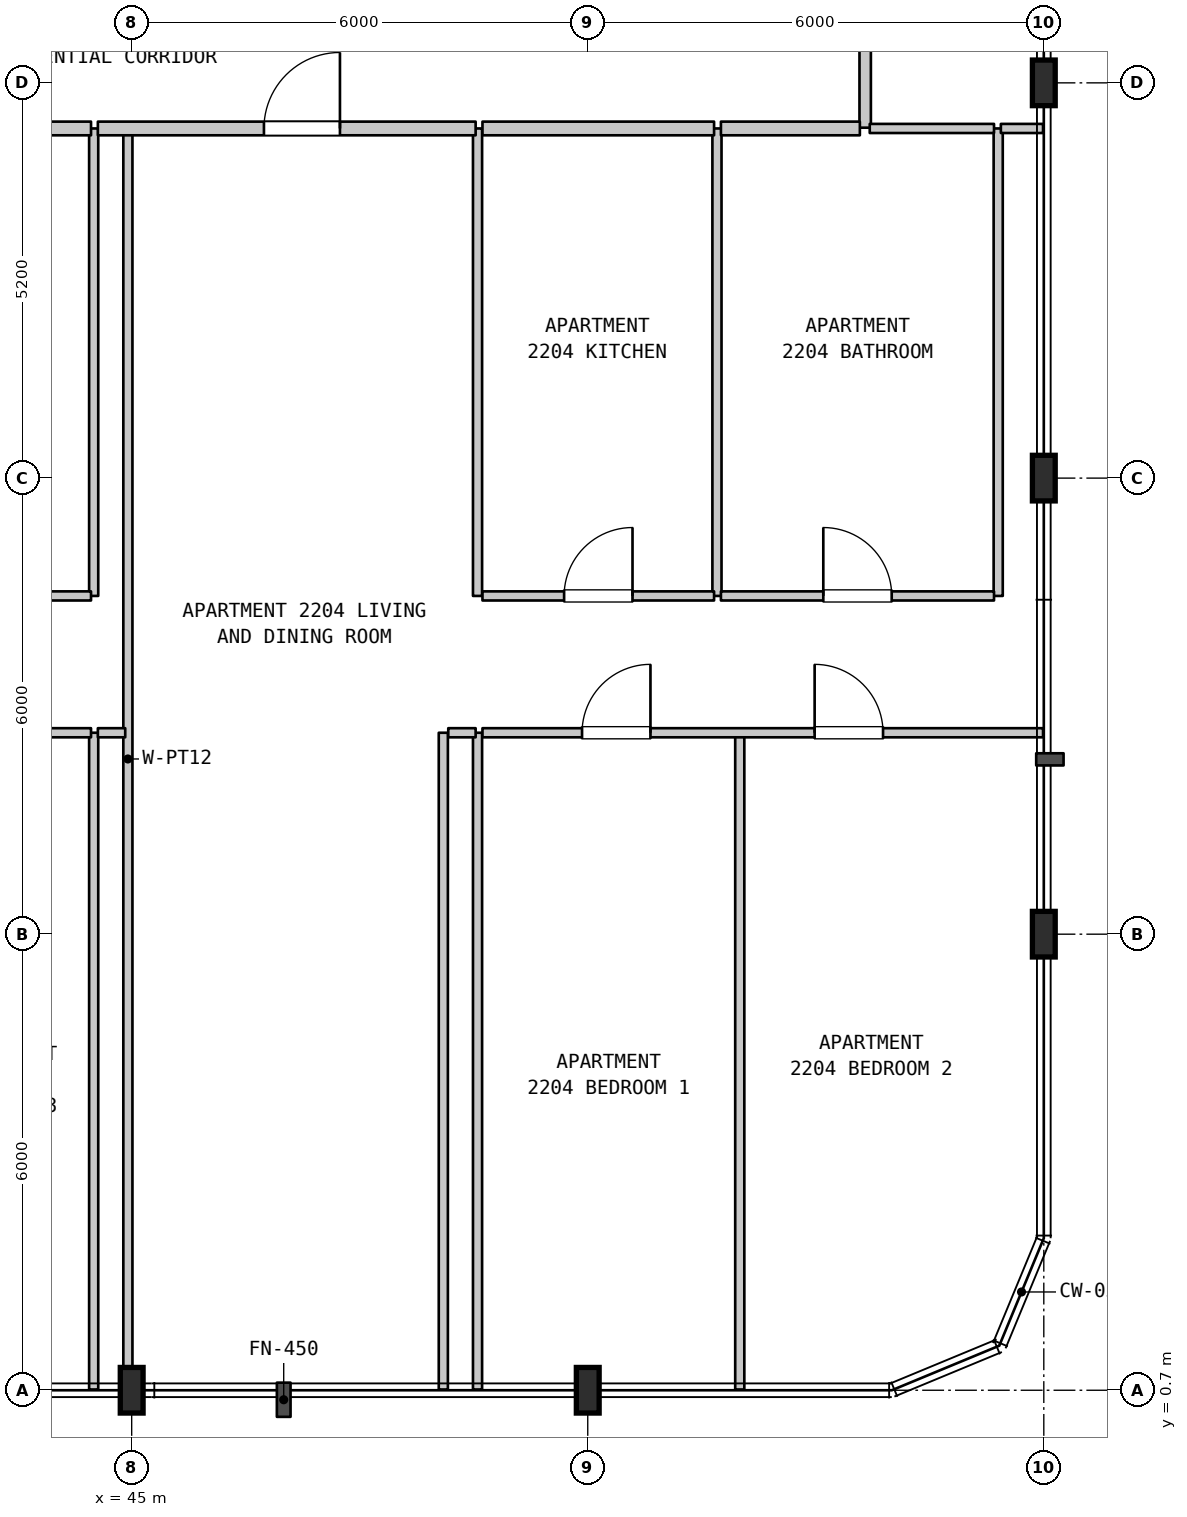
"""IFC4 building model, lengths in metres.
Left out: names, types, materials, properties, quantities, classifications, styles, units other than length and angle.
Written with IfcOpenShell. Run it as: python <this file> out.ifc"""

import sys

from ifc_helpers import new_model, si_unit, direction, frame, frame_2d, origin, origin_2d, place, context, subcontext, project, spatial, rectangle, i_section, extrude, element, fill, save


model = new_model("IFC4")
c1 = context("Model", 3, precision=1e-05, world=origin(), true_north=direction((0.0, 1.0)))
c2 = subcontext(c1, "Body", "Model", "MODEL_VIEW")
j1 = project(units=[si_unit("LENGTHUNIT", "METRE"), si_unit("PLANEANGLEUNIT", "RADIAN")], contexts=[c1])
p1 = place(None, origin())
s1 = spatial("IfcSite", under=j1, at=p1, CompositionType="ELEMENT")
p2 = place(p1, origin())
s2 = spatial("IfcBuilding", under=s1, at=p2, CompositionType="ELEMENT")
p3 = place(p2, frame((0.0, 0.0, 94.6)))
s3 = spatial("IfcBuildingStorey", under=s2, at=p3, CompositionType="ELEMENT", Elevation=94.6)
for number, where, z_axis, x_axis in (
    (1, (45.0, 0.7, 0.0), (0.0, 0.0, 1.0), (1.0, 0.0, 0.0)),
    (2, (51.0, 0.7, 0.0), (0.0, 0.0, 1.0), (1.0, 0.0, 0.0)),
    (3, (57.0, 6.7, 0.0), (0.0, 0.0, 1.0), (1.0, 0.0, 0.0)),
    (4, (57.0, 12.7, 0.0), (0.0, 0.0, 1.0), (1.0, 0.0, 0.0)),
    (5, (57.0, 17.9, 0.0), (0.0, 0.0, 1.0), (1.0, 0.0, 0.0)),
):
    element("IfcColumn", number, at=place(p3, frame(where, z_axis=z_axis, x_axis=x_axis)), inside=s3, PredefinedType="COLUMN", context=c2, shape_type="SweptSolid", body=[
        extrude(i_section(OverallWidth=0.3, OverallDepth=0.6, WebThickness=0.015, FlangeThickness=0.03, FilletRadius=0.027, at=origin_2d()), origin(), (0.0, 0.0, 1.0), 3.7),
    ])
p4 = place(p3, frame((44.5, 0.71, 0.0), z_axis=(0.0, 0.0, 1.0), x_axis=(0.0, 1.0, 0.0)))
e6 = element("IfcWall", 6, at=p4, inside=s3, PredefinedType="PARTITIONING", context=c2, shape_type="SweptSolid", body=[
    extrude(rectangle(XDim=8.64, YDim=0.12, at=frame_2d((4.32, 0.0))), origin(), (0.0, 0.0, 1.0), 3.385),
])
p5 = place(p3, frame((44.5, 11.15, 0.0), z_axis=(0.0, 0.0, 1.0), x_axis=(0.0, 1.0, 0.0)))
e7 = element("IfcWall", 7, at=p5, inside=s3, PredefinedType="PARTITIONING", context=c2, shape_type="SweptSolid", body=[
    extrude(rectangle(XDim=6.15, YDim=0.12, at=frame_2d((3.075, 0.0))), origin(), (0.0, 0.0, 1.0), 3.385),
])
p6 = place(p3, frame((44.95, 0.71, 0.0), z_axis=(0.0, 0.0, 1.0), x_axis=(0.0, 1.0, 0.0)))
e8 = element("IfcWall", 8, at=p6, inside=s3, PredefinedType="PARTITIONING", context=c2, shape_type="SweptSolid", body=[
    extrude(rectangle(XDim=16.59, YDim=0.12, at=frame_2d((8.295, 0.0))), origin(), (0.0, 0.0, 1.0), 3.385),
])
for number, where, z_axis, x_axis in (
    (9, (49.1, 0.71, 0.0), (0.0, 0.0, 1.0), (0.0, 1.0, 0.0)),
    (10, (49.55, 0.71, 0.0), (0.0, 0.0, 1.0), (0.0, 1.0, 0.0)),
):
    element("IfcWall", number, at=place(p3, frame(where, z_axis=z_axis, x_axis=x_axis)), inside=s3, PredefinedType="PARTITIONING", context=c2, shape_type="SweptSolid", body=[
        extrude(rectangle(XDim=8.64, YDim=0.12, at=frame_2d((4.32, 0.0))), origin(), (0.0, 0.0, 1.0), 3.385),
    ])
for number, where, z_axis, x_axis in (
    (11, (49.55, 11.15, 0.0), (0.0, 0.0, 1.0), (0.0, 1.0, 0.0)),
    (12, (52.7, 11.15, 0.0), (0.0, 0.0, 1.0), (0.0, 1.0, 0.0)),
):
    element("IfcWall", number, at=place(p3, frame(where, z_axis=z_axis, x_axis=x_axis)), inside=s3, PredefinedType="PARTITIONING", context=c2, shape_type="SweptSolid", body=[
        extrude(rectangle(XDim=6.15, YDim=0.12, at=frame_2d((3.075, 0.0))), origin(), (0.0, 0.0, 1.0), 3.385),
    ])
p7 = place(p3, frame((53.0, 0.71, 0.0), z_axis=(0.0, 0.0, 1.0), x_axis=(0.0, 1.0, 0.0)))
e13 = element("IfcWall", 13, at=p7, inside=s3, PredefinedType="PARTITIONING", context=c2, shape_type="SweptSolid", body=[
    extrude(rectangle(XDim=8.64, YDim=0.12, at=frame_2d((4.32, 0.0))), origin(), (0.0, 0.0, 1.0), 3.385),
])
p8 = place(p3, frame((54.65, 17.31, 0.0), z_axis=(0.0, 0.0, 1.0), x_axis=(0.0, 1.0, 0.0)))
e14 = element("IfcWall", 14, at=p8, inside=s3, PredefinedType="STANDARD", context=c2, shape_type="SweptSolid", body=[
    extrude(rectangle(XDim=2.19, YDim=0.15, at=frame_2d((1.095, 0.0))), origin(), (0.0, 0.0, 1.0), 3.385),
])
p9 = place(p3, frame((56.4, 11.15, 0.0), z_axis=(0.0, 0.0, 1.0), x_axis=(0.0, 1.0, 0.0)))
e15 = element("IfcWall", 15, at=p9, inside=s3, PredefinedType="PARTITIONING", context=c2, shape_type="SweptSolid", body=[
    extrude(rectangle(XDim=6.15, YDim=0.12, at=frame_2d((3.075, 0.0))), origin(), (0.0, 0.0, 1.0), 3.385),
])
p10 = place(p3, frame((37.425, 9.35, 0.0), z_axis=(0.0, 0.0, 1.0), x_axis=(1.0, 0.0, 0.0)))
e16 = element("IfcWall", 16, at=p10, inside=s3, PredefinedType="PARTITIONING", context=c2, shape_type="SweptSolid", body=[
    extrude(rectangle(XDim=7.04, YDim=0.12, at=frame_2d((3.52, 0.0))), origin(), (0.0, 0.0, 1.0), 3.385),
])
p11 = place(p10, frame((0.868, 0.0, 0.0)))
e17 = element("IfcOpeningElement", 17, at=p11, cuts=e16, PredefinedType="OPENING", context=c2, shape_type="SweptSolid", body=[
    extrude(rectangle(XDim=0.9, YDim=2.15, at=frame_2d((0.45, 1.075))), frame((0.0, 0.07, 0.0), z_axis=(0.0, -1.0, 0.0), x_axis=(1.0, 0.0, 0.0)), (0.0, 0.0, 1.0), 0.14),
])
p12 = place(p10, frame((2.999, 0.0, 0.0)))
e18 = element("IfcOpeningElement", 18, at=p12, cuts=e16, PredefinedType="OPENING", context=c2, shape_type="SweptSolid", body=[
    extrude(rectangle(XDim=0.9, YDim=2.15, at=frame_2d((0.45, 1.075))), frame((0.0, 0.07, 0.0), z_axis=(0.0, -1.0, 0.0), x_axis=(1.0, 0.0, 0.0)), (0.0, 0.0, 1.0), 0.14),
])
p13 = place(p10, frame((5.272, 0.0, 0.0)))
e19 = element("IfcOpeningElement", 19, at=p13, cuts=e16, PredefinedType="OPENING", context=c2, shape_type="SweptSolid", body=[
    extrude(rectangle(XDim=0.9, YDim=2.15, at=frame_2d((0.45, 1.075))), frame((0.0, 0.07, 0.0), z_axis=(0.0, -1.0, 0.0), x_axis=(1.0, 0.0, 0.0)), (0.0, 0.0, 1.0), 0.14),
])
p14 = place(p3, frame((44.555, 9.35, 0.0), z_axis=(0.0, 0.0, 1.0), x_axis=(1.0, 0.0, 0.0)))
e20 = element("IfcWall", 20, at=p14, inside=s3, PredefinedType="PARTITIONING", context=c2, shape_type="SweptSolid", body=[
    extrude(rectangle(XDim=0.36, YDim=0.12, at=frame_2d((0.18, 0.0))), origin(), (0.0, 0.0, 1.0), 3.385),
])
p15 = place(p3, frame((49.165, 9.35, 0.0), z_axis=(0.0, 0.0, 1.0), x_axis=(1.0, 0.0, 0.0)))
e21 = element("IfcWall", 21, at=p15, inside=s3, PredefinedType="PARTITIONING", context=c2, shape_type="SweptSolid", body=[
    extrude(rectangle(XDim=0.36, YDim=0.12, at=frame_2d((0.18, 0.0))), origin(), (0.0, 0.0, 1.0), 3.385),
])
p16 = place(p3, frame((49.615, 9.35, 0.0), z_axis=(0.0, 0.0, 1.0), x_axis=(1.0, 0.0, 0.0)))
e22 = element("IfcWall", 22, at=p16, inside=s3, PredefinedType="PARTITIONING", context=c2, shape_type="SweptSolid", body=[
    extrude(rectangle(XDim=7.375, YDim=0.12, at=frame_2d((3.688, 0.0))), origin(), (0.0, 0.0, 1.0), 3.385),
])
p17 = place(p16, frame((1.31, 0.0, 0.0)))
e23 = element("IfcOpeningElement", 23, at=p17, cuts=e22, PredefinedType="OPENING", context=c2, shape_type="SweptSolid", body=[
    extrude(rectangle(XDim=0.9, YDim=2.15, at=frame_2d((0.45, 1.075))), frame((0.0, 0.07, 0.0), z_axis=(0.0, -1.0, 0.0), x_axis=(1.0, 0.0, 0.0)), (0.0, 0.0, 1.0), 0.14),
])
p18 = place(p16, frame((4.37, 0.0, 0.0)))
e24 = element("IfcOpeningElement", 24, at=p18, cuts=e22, PredefinedType="OPENING", context=c2, shape_type="SweptSolid", body=[
    extrude(rectangle(XDim=0.9, YDim=2.15, at=frame_2d((0.45, 1.075))), frame((0.0, 0.07, 0.0), z_axis=(0.0, -1.0, 0.0), x_axis=(1.0, 0.0, 0.0)), (0.0, 0.0, 1.0), 0.14),
])
p19 = place(p3, frame((40.705, 11.15, 0.0), z_axis=(0.0, 0.0, 1.0), x_axis=(1.0, 0.0, 0.0)))
e25 = element("IfcWall", 25, at=p19, inside=s3, PredefinedType="PARTITIONING", context=c2, shape_type="SweptSolid", body=[
    extrude(rectangle(XDim=3.76, YDim=0.12, at=frame_2d((1.88, 0.0))), origin(), (0.0, 0.0, 1.0), 3.385),
])
p20 = place(p19, frame((1.358, 0.0, 0.0)))
e26 = element("IfcOpeningElement", 26, at=p20, cuts=e25, PredefinedType="OPENING", context=c2, shape_type="SweptSolid", body=[
    extrude(rectangle(XDim=0.9, YDim=2.1, at=frame_2d((0.45, 1.05))), frame((0.0, 0.07, 0.0), z_axis=(0.0, -1.0, 0.0), x_axis=(1.0, 0.0, 0.0)), (0.0, 0.0, 1.0), 0.14),
])
p21 = place(p3, frame((49.615, 11.15, 0.0), z_axis=(0.0, 0.0, 1.0), x_axis=(1.0, 0.0, 0.0)))
e27 = element("IfcWall", 27, at=p21, inside=s3, PredefinedType="PARTITIONING", context=c2, shape_type="SweptSolid", body=[
    extrude(rectangle(XDim=3.047, YDim=0.12, at=frame_2d((1.523, 0.0))), origin(), (0.0, 0.0, 1.0), 3.385),
])
p22 = place(p21, frame((1.074, 0.0, 0.0)))
e28 = element("IfcOpeningElement", 28, at=p22, cuts=e27, PredefinedType="OPENING", context=c2, shape_type="SweptSolid", body=[
    extrude(rectangle(XDim=0.9, YDim=2.15, at=frame_2d((0.45, 1.075))), frame((0.0, 0.07, 0.0), z_axis=(0.0, -1.0, 0.0), x_axis=(1.0, 0.0, 0.0)), (0.0, 0.0, 1.0), 0.14),
])
p23 = place(p3, frame((52.752, 11.15, 0.0), z_axis=(0.0, 0.0, 1.0), x_axis=(1.0, 0.0, 0.0)))
e29 = element("IfcWall", 29, at=p23, inside=s3, PredefinedType="PARTITIONING", context=c2, shape_type="SweptSolid", body=[
    extrude(rectangle(XDim=3.593, YDim=0.12, at=frame_2d((1.796, 0.0))), origin(), (0.0, 0.0, 1.0), 3.385),
])
p24 = place(p23, frame((1.347, 0.0, 0.0)))
e30 = element("IfcOpeningElement", 30, at=p24, cuts=e29, PredefinedType="OPENING", context=c2, shape_type="SweptSolid", body=[
    extrude(rectangle(XDim=0.9, YDim=2.1, at=frame_2d((0.45, 1.05))), frame((0.0, 0.07, 0.0), z_axis=(0.0, -1.0, 0.0), x_axis=(1.0, 0.0, 0.0)), (0.0, 0.0, 1.0), 0.14),
])
p25 = place(p3, frame((40.705, 17.3, 0.0), z_axis=(0.0, 0.0, 1.0), x_axis=(1.0, 0.0, 0.0)))
e31 = element("IfcWall", 31, at=p25, inside=s3, PredefinedType="STANDARD", context=c2, shape_type="SweptSolid", body=[
    extrude(rectangle(XDim=3.76, YDim=0.18, at=frame_2d((1.88, 0.0))), origin(), (0.0, 0.0, 1.0), 3.385),
])
p26 = place(p3, frame((44.555, 17.3, 0.0), z_axis=(0.0, 0.0, 1.0), x_axis=(1.0, 0.0, 0.0)))
e32 = element("IfcWall", 32, at=p26, inside=s3, PredefinedType="STANDARD", context=c2, shape_type="SweptSolid", body=[
    extrude(rectangle(XDim=4.97, YDim=0.18, at=frame_2d((2.485, 0.0))), origin(), (0.0, 0.0, 1.0), 3.385),
])
p27 = place(p26, frame((2.185, 0.0, 0.0)))
e33 = element("IfcOpeningElement", 33, at=p27, cuts=e32, PredefinedType="OPENING", context=c2, shape_type="SweptSolid", body=[
    extrude(rectangle(XDim=1.0, YDim=2.15, at=frame_2d((0.5, 1.075))), frame((0.0, 0.1, 0.0), z_axis=(0.0, -1.0, 0.0), x_axis=(1.0, 0.0, 0.0)), (0.0, 0.0, 1.0), 0.2),
])
p28 = place(p3, frame((49.615, 17.3, 0.0), z_axis=(0.0, 0.0, 1.0), x_axis=(1.0, 0.0, 0.0)))
e34 = element("IfcWall", 34, at=p28, inside=s3, PredefinedType="STANDARD", context=c2, shape_type="SweptSolid", body=[
    extrude(rectangle(XDim=3.047, YDim=0.18, at=frame_2d((1.523, 0.0))), origin(), (0.0, 0.0, 1.0), 3.385),
])
p29 = place(p3, frame((52.752, 17.3, 0.0), z_axis=(0.0, 0.0, 1.0), x_axis=(1.0, 0.0, 0.0)))
e35 = element("IfcWall", 35, at=p29, inside=s3, PredefinedType="STANDARD", context=c2, shape_type="SweptSolid", body=[
    extrude(rectangle(XDim=1.828, YDim=0.18, at=frame_2d((0.914, 0.0))), origin(), (0.0, 0.0, 1.0), 3.385),
])
p30 = place(p3, frame((54.71, 17.3, 0.0), z_axis=(0.0, 0.0, 1.0), x_axis=(1.0, 0.0, 0.0)))
e36 = element("IfcWall", 36, at=p30, inside=s3, PredefinedType="PARTITIONING", context=c2, shape_type="SweptSolid", body=[
    extrude(rectangle(XDim=1.635, YDim=0.12, at=frame_2d((0.817, 0.0))), origin(), (0.0, 0.0, 1.0), 3.385),
])
p31 = place(p3, frame((56.435, 17.3, 0.0), z_axis=(0.0, 0.0, 1.0), x_axis=(1.0, 0.0, 0.0)))
e37 = element("IfcWall", 37, at=p31, inside=s3, PredefinedType="PARTITIONING", context=c2, shape_type="SweptSolid", body=[
    extrude(rectangle(XDim=0.555, YDim=0.12, at=frame_2d((0.277, 0.0))), origin(), (0.0, 0.0, 1.0), 3.385),
])
p32 = place(p17, origin())
e38 = element("IfcDoor", 38, at=p32, inside=s3, OperationType="SINGLE_SWING_RIGHT", PredefinedType="DOOR", context=c2, shape_type="SweptSolid", body=[
    extrude(rectangle(XDim=0.9, YDim=2.15, at=frame_2d((0.45, 1.075))), frame((0.0, 0.025, 0.0), z_axis=(0.0, -1.0, 0.0), x_axis=(1.0, 0.0, 0.0)), (0.0, 0.0, 1.0), 0.05),
])
fill(e23, e38)
p33 = place(p18, origin())
e39 = element("IfcDoor", 39, at=p33, inside=s3, OperationType="SINGLE_SWING_LEFT", PredefinedType="DOOR", context=c2, shape_type="SweptSolid", body=[
    extrude(rectangle(XDim=0.9, YDim=2.15, at=frame_2d((0.45, 1.075))), frame((0.0, 0.025, 0.0), z_axis=(0.0, -1.0, 0.0), x_axis=(1.0, 0.0, 0.0)), (0.0, 0.0, 1.0), 0.05),
])
fill(e24, e39)
p34 = place(p22, origin())
e40 = element("IfcDoor", 40, at=p34, inside=s3, OperationType="SINGLE_SWING_RIGHT", PredefinedType="DOOR", context=c2, shape_type="SweptSolid", body=[
    extrude(rectangle(XDim=0.9, YDim=2.15, at=frame_2d((0.45, 1.075))), frame((0.0, 0.025, 0.0), z_axis=(0.0, -1.0, 0.0), x_axis=(1.0, 0.0, 0.0)), (0.0, 0.0, 1.0), 0.05),
])
fill(e28, e40)
p35 = place(p24, origin())
e41 = element("IfcDoor", 41, at=p35, inside=s3, OperationType="SINGLE_SWING_LEFT", PredefinedType="DOOR", context=c2, shape_type="SweptSolid", body=[
    extrude(rectangle(XDim=0.9, YDim=2.1, at=frame_2d((0.45, 1.05))), frame((0.0, 0.025, 0.0), z_axis=(0.0, -1.0, 0.0), x_axis=(1.0, 0.0, 0.0)), (0.0, 0.0, 1.0), 0.05),
])
fill(e30, e41)
p36 = place(p27, origin())
e42 = element("IfcDoor", 42, at=p36, inside=s3, OperationType="SINGLE_SWING_RIGHT", PredefinedType="DOOR", context=c2, shape_type="SweptSolid", body=[
    extrude(rectangle(XDim=1.0, YDim=2.15, at=frame_2d((0.5, 1.075))), frame((0.0, 0.025, 0.0), z_axis=(0.0, -1.0, 0.0), x_axis=(1.0, 0.0, 0.0)), (0.0, 0.0, 1.0), 0.05),
])
fill(e33, e42)
save(model, sys.argv[1])
